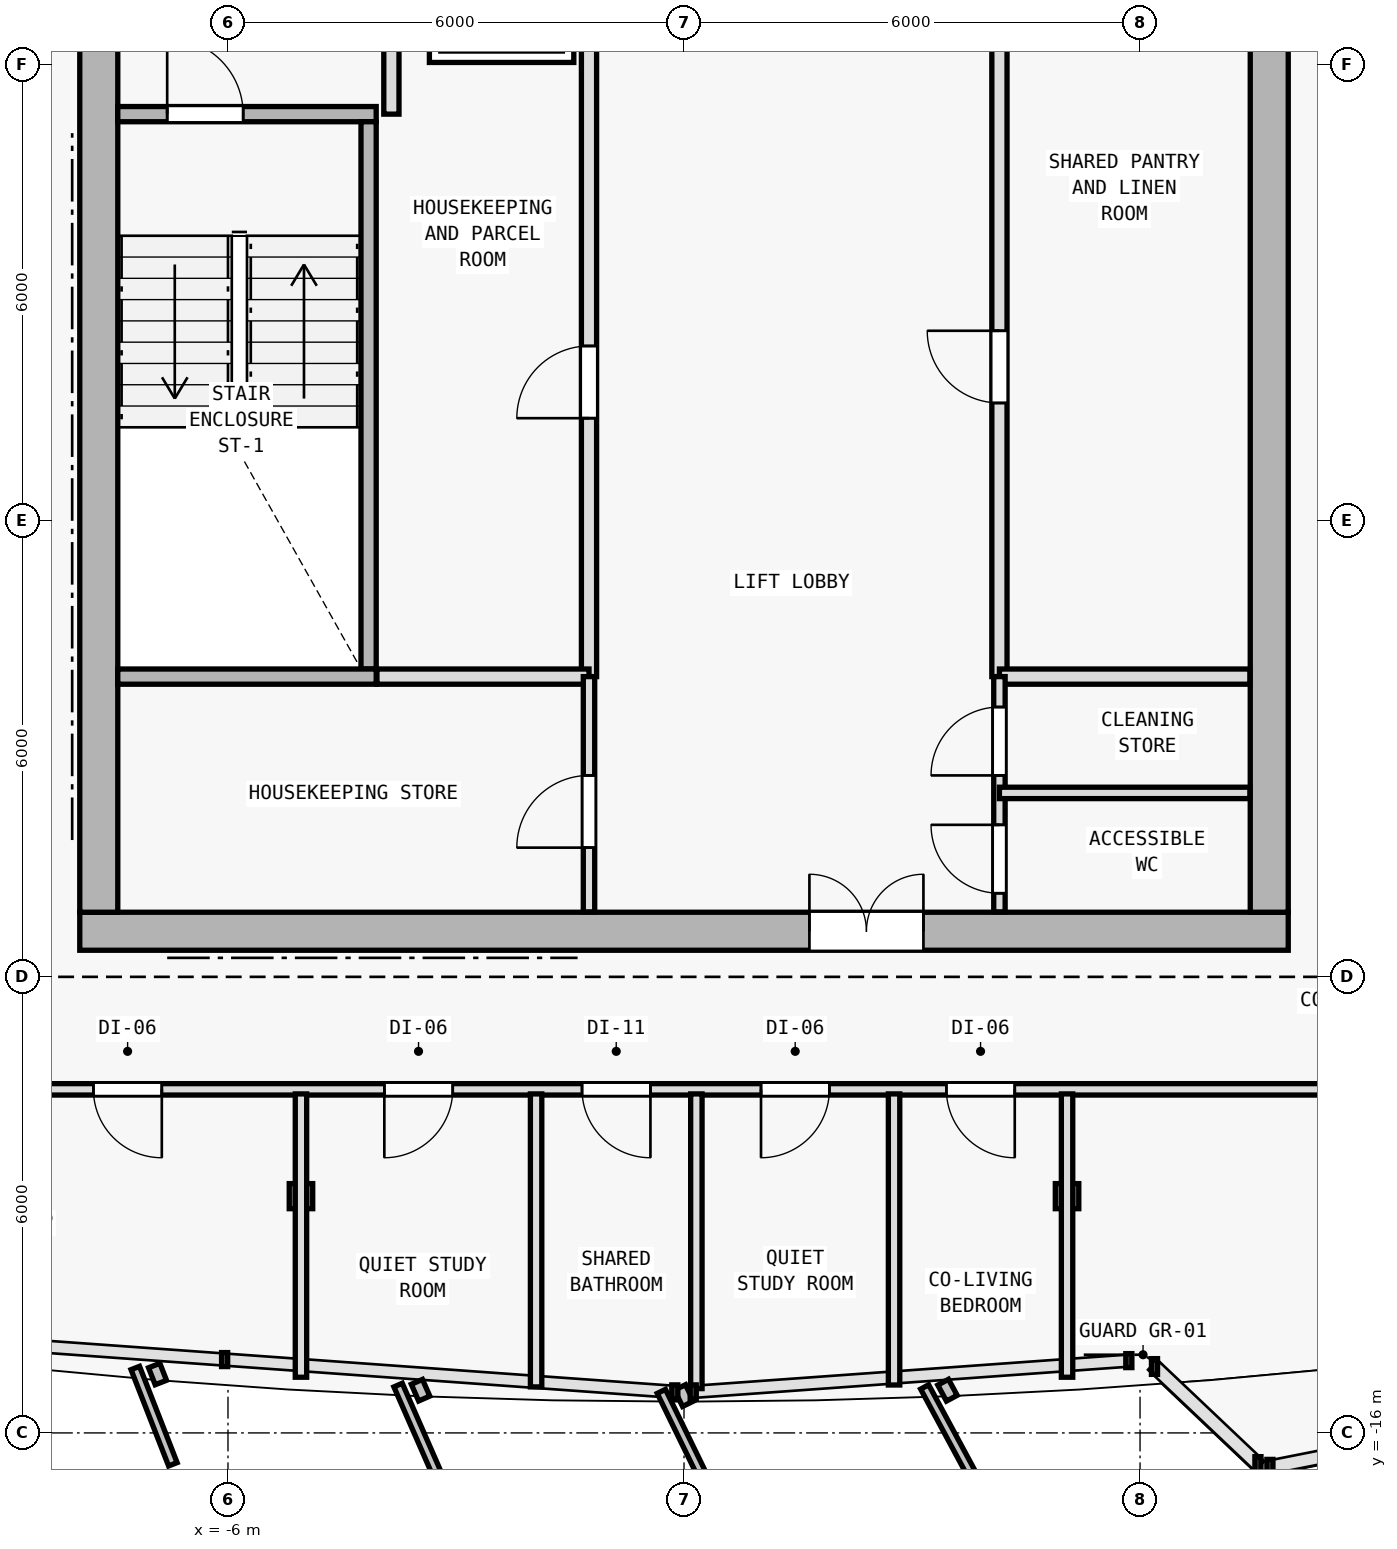
"""IFC4 building model, lengths in metres.
Left out: names, types, materials, properties, quantities, classifications, styles, units other than length and angle.
Written with IfcOpenShell. Run it as: python <this file> out.ifc"""

import sys

from ifc_helpers import new_model, si_unit, direction, frame, frame_2d, origin, origin_2d, place, context, subcontext, project, spatial, rectangle, i_section, extrude, element, fill, save


model = new_model("IFC4")
c1 = context("Model", 3, precision=1e-05, world=origin(), true_north=direction((0.0, 1.0)))
c2 = subcontext(c1, "Body", "Model", "MODEL_VIEW")
j1 = project(units=[si_unit("LENGTHUNIT", "METRE"), si_unit("PLANEANGLEUNIT", "RADIAN")], contexts=[c1])
p1 = place(None, origin())
s1 = spatial("IfcSite", under=j1, at=p1, CompositionType="ELEMENT")
p2 = place(p1, origin())
s2 = spatial("IfcBuilding", under=s1, at=p2, CompositionType="ELEMENT")
p3 = place(p2, frame((0.0, 0.0, 294.0)))
s3 = spatial("IfcBuildingStorey", under=s2, at=p3, CompositionType="ELEMENT", Elevation=294.0)
for number, where, z_axis, x_axis in (
    (1, (-7.7, -9.4, 0.0), (0.0, 0.0, 1.0), (1.0, 0.0, 0.0)),
    (2, (7.7, -9.4, 0.0), (0.0, 0.0, 1.0), (1.0, 0.0, 0.0)),
    (3, (0.0, -9.4, 0.0), (0.0, 0.0, 1.0), (1.0, 0.0, 0.0)),
    (4, (7.7, 0.4, 0.0), (0.0, 0.0, 1.0), (1.0, 0.0, 0.0)),
    (5, (-7.7, 2.0, 0.0), (0.0, 0.0, 1.0), (1.0, 0.0, 0.0)),
):
    element("IfcColumn", number, at=place(p3, frame(where, z_axis=z_axis, x_axis=x_axis)), inside=s3, PredefinedType="COLUMN", context=c2, shape_type="SweptSolid", body=[
        extrude(i_section(OverallWidth=0.374, OverallDepth=0.372, WebThickness=0.012, FlangeThickness=0.02, FilletRadius=0.015, at=origin_2d()), origin(), (0.0, 0.0, 1.0), 3.6),
    ])
for number, where, z_axis, x_axis in (
    (6, (-5.04, -12.885, 0.006), (0.0, 0.0, 1.0), (1.0, 0.0, 0.0)),
    (7, (5.04, -12.885, 0.006), (0.0, 0.0, 1.0), (1.0, 0.0, 0.0)),
):
    element("IfcColumn", number, at=place(p3, frame(where, z_axis=z_axis, x_axis=x_axis)), inside=s3, PredefinedType="COLUMN", context=c2, shape_type="SweptSolid", body=[
        extrude(i_section(OverallWidth=0.309, OverallDepth=0.33, WebThickness=0.011, FlangeThickness=0.019, FilletRadius=0.027, at=origin_2d()), origin(), (0.0, 0.0, 1.0), 3.594),
    ])
p4 = place(p3, frame((-7.95, -9.4, 0.0), z_axis=(0.0, 0.0, 1.0), x_axis=(1.0, 0.0, 0.0)))
e8 = element("IfcWall", 8, at=p4, inside=s3, PredefinedType="SHEAR", context=c2, shape_type="SweptSolid", body=[
    extrude(rectangle(XDim=15.9, YDim=0.5, at=frame_2d((7.95, 0.0))), origin(), (0.0, 0.0, 1.0), 3.34),
])
p5 = place(p4, frame((9.6, 0.0, 0.0)))
e9 = element("IfcOpeningElement", 9, at=p5, cuts=e8, PredefinedType="OPENING", context=c2, shape_type="SweptSolid", body=[
    extrude(rectangle(XDim=1.5, YDim=2.2, at=frame_2d((0.75, 1.1))), frame((0.0, 0.26, 0.0), z_axis=(0.0, -1.0, 0.0), x_axis=(1.0, 0.0, 0.0)), (0.0, 0.0, 1.0), 0.52),
])
p6 = place(p3, frame((-7.7, -9.15, 0.0), z_axis=(0.0, 0.0, 1.0), x_axis=(0.0, 1.0, 0.0)))
e10 = element("IfcWall", 10, at=p6, inside=s3, PredefinedType="SHEAR", context=c2, shape_type="SweptSolid", body=[
    extrude(rectangle(XDim=19.1, YDim=0.5, at=frame_2d((9.55, 0.0))), origin(), (0.0, 0.0, 1.0), 3.34),
])
p7 = place(p6, frame((12.7, 0.0, 0.0)))
e11 = element("IfcOpeningElement", 11, at=p7, cuts=e10, PredefinedType="OPENING", context=c2, shape_type="SweptSolid", body=[
    extrude(rectangle(XDim=1.1, YDim=2.15, at=frame_2d((0.55, 1.075))), frame((0.0, 0.26, 0.0), z_axis=(0.0, -1.0, 0.0), x_axis=(1.0, 0.0, 0.0)), (0.0, 0.0, 1.0), 0.52),
])
p8 = place(p3, frame((7.7, 9.95, 0.0), z_axis=(0.0, 0.0, 1.0), x_axis=(0.0, -1.0, 0.0)))
e12 = element("IfcWall", 12, at=p8, inside=s3, PredefinedType="SHEAR", context=c2, shape_type="SweptSolid", body=[
    extrude(rectangle(XDim=19.1, YDim=0.5, at=frame_2d((9.55, 0.0))), origin(), (0.0, 0.0, 1.0), 3.34),
])
p9 = place(p3, frame((-7.45, 1.35, 0.0), z_axis=(0.0, 0.0, 1.0), x_axis=(1.0, 0.0, 0.0)))
e13 = element("IfcWall", 13, at=p9, inside=s3, PredefinedType="SOLIDWALL", context=c2, shape_type="SweptSolid", body=[
    extrude(rectangle(XDim=3.4, YDim=0.2, at=frame_2d((1.7, 0.0))), origin(), (0.0, 0.0, 1.0), 3.34),
])
p10 = place(p9, frame((0.65, 0.0, 0.0)))
e14 = element("IfcOpeningElement", 14, at=p10, cuts=e13, PredefinedType="OPENING", context=c2, shape_type="SweptSolid", body=[
    extrude(rectangle(XDim=1.0, YDim=2.15, at=frame_2d((0.5, 1.075))), frame((0.0, 0.11, 0.0), z_axis=(0.0, -1.0, 0.0), x_axis=(1.0, 0.0, 0.0)), (0.0, 0.0, 1.0), 0.22),
])
p11 = place(p3, frame((-4.15, -5.95, 0.0), z_axis=(0.0, 0.0, 1.0), x_axis=(0.0, 1.0, 0.0)))
e15 = element("IfcWall", 15, at=p11, inside=s3, PredefinedType="SOLIDWALL", context=c2, shape_type="SweptSolid", body=[
    extrude(rectangle(XDim=7.2, YDim=0.2, at=frame_2d((3.6, 0.0))), origin(), (0.0, 0.0, 1.0), 3.34),
])
p12 = place(p3, frame((-3.85, 1.35, 0.0), z_axis=(0.0, 0.0, 1.0), x_axis=(0.0, 1.0, 0.0)))
e16 = element("IfcWall", 16, at=p12, inside=s3, PredefinedType="SOLIDWALL", context=c2, shape_type="SweptSolid", body=[
    extrude(rectangle(XDim=8.595, YDim=0.2, at=frame_2d((4.297, 0.0))), origin(), (0.0, 0.0, 1.0), 3.34),
])
p13 = place(p12, frame((1.5, 0.0, 0.0)))
e17 = element("IfcOpeningElement", 17, at=p13, cuts=e16, PredefinedType="OPENING", context=c2, shape_type="SweptSolid", body=[
    extrude(rectangle(XDim=1.0, YDim=2.15, at=frame_2d((0.5, 1.075))), frame((0.0, 0.11, 0.0), z_axis=(0.0, -1.0, 0.0), x_axis=(1.0, 0.0, 0.0)), (0.0, 0.0, 1.0), 0.22),
])
p14 = place(p12, frame((3.18, 0.0, 0.0)))
e18 = element("IfcOpeningElement", 18, at=p14, cuts=e16, PredefinedType="OPENING", context=c2, shape_type="SweptSolid", body=[
    extrude(rectangle(XDim=1.0, YDim=2.15, at=frame_2d((0.5, 1.075))), frame((0.0, 0.11, 0.0), z_axis=(0.0, -1.0, 0.0), x_axis=(1.0, 0.0, 0.0)), (0.0, 0.0, 1.0), 0.22),
])
p15 = place(p3, frame((4.15, -6.05, 0.0), z_axis=(0.0, 0.0, 1.0), x_axis=(0.0, 1.0, 0.0)))
e19 = element("IfcWall", 19, at=p15, inside=s3, PredefinedType="SOLIDWALL", context=c2, shape_type="SweptSolid", body=[
    extrude(rectangle(XDim=8.7, YDim=0.2, at=frame_2d((4.35, 0.0))), origin(), (0.0, 0.0, 1.0), 3.34),
])
p16 = place(p15, frame((3.6, 0.0, 0.0)))
e20 = element("IfcOpeningElement", 20, at=p16, cuts=e19, PredefinedType="OPENING", context=c2, shape_type="SweptSolid", body=[
    extrude(rectangle(XDim=0.95, YDim=2.1, at=frame_2d((0.475, 1.05))), frame((0.0, 0.11, 0.0), z_axis=(0.0, -1.0, 0.0), x_axis=(1.0, 0.0, 0.0)), (0.0, 0.0, 1.0), 0.22),
])
p17 = place(p3, frame((-1.25, -6.05, 0.0), z_axis=(0.0, 0.0, 1.0), x_axis=(0.0, 1.0, 0.0)))
e21 = element("IfcWall", 21, at=p17, inside=s3, PredefinedType="SOLIDWALL", context=c2, shape_type="SweptSolid", body=[
    extrude(rectangle(XDim=8.7, YDim=0.2, at=frame_2d((4.35, 0.0))), origin(), (0.0, 0.0, 1.0), 3.34),
])
p18 = place(p17, frame((3.4, 0.0, 0.0)))
e22 = element("IfcOpeningElement", 22, at=p18, cuts=e21, PredefinedType="OPENING", context=c2, shape_type="SweptSolid", body=[
    extrude(rectangle(XDim=0.95, YDim=2.1, at=frame_2d((0.475, 1.05))), frame((0.0, 0.11, 0.0), z_axis=(0.0, -1.0, 0.0), x_axis=(1.0, 0.0, 0.0)), (0.0, 0.0, 1.0), 0.22),
])
p19 = place(p3, frame((-7.45, -6.05, 0.0), z_axis=(0.0, 0.0, 1.0), x_axis=(1.0, 0.0, 0.0)))
e23 = element("IfcWall", 23, at=p19, inside=s3, PredefinedType="SOLIDWALL", context=c2, shape_type="SweptSolid", body=[
    extrude(rectangle(XDim=3.4, YDim=0.2, at=frame_2d((1.7, 0.0))), origin(), (0.0, 0.0, 1.0), 3.34),
])
p20 = place(p3, frame((-4.04, -6.05, 0.0), z_axis=(0.0, 0.0, 1.0), x_axis=(1.0, 0.0, 0.0)))
e24 = element("IfcWall", 24, at=p20, inside=s3, PredefinedType="SOLIDWALL", context=c2, shape_type="SweptSolid", body=[
    extrude(rectangle(XDim=2.79, YDim=0.2, at=frame_2d((1.395, 0.0))), origin(), (0.0, 0.0, 1.0), 3.34),
])
p21 = place(p3, frame((4.15, -6.05, 0.0), z_axis=(0.0, 0.0, 1.0), x_axis=(1.0, 0.0, 0.0)))
e25 = element("IfcWall", 25, at=p21, inside=s3, PredefinedType="SOLIDWALL", context=c2, shape_type="SweptSolid", body=[
    extrude(rectangle(XDim=3.295, YDim=0.2, at=frame_2d((1.647, 0.0))), origin(), (0.0, 0.0, 1.0), 3.34),
])
p22 = place(p3, frame((-1.25, -9.145, 0.0), z_axis=(0.0, 0.0, 1.0), x_axis=(0.0, 1.0, 0.0)))
e26 = element("IfcWall", 26, at=p22, inside=s3, PredefinedType="PARTITIONING", context=c2, shape_type="SweptSolid", body=[
    extrude(rectangle(XDim=3.095, YDim=0.15, at=frame_2d((1.547, 0.0))), origin(), (0.0, 0.0, 1.0), 3.34),
])
p23 = place(p22, frame((0.845, 0.0, 0.0)))
e27 = element("IfcOpeningElement", 27, at=p23, cuts=e26, PredefinedType="OPENING", context=c2, shape_type="SweptSolid", body=[
    extrude(rectangle(XDim=0.95, YDim=2.1, at=frame_2d((0.475, 1.05))), frame((0.0, 0.085, 0.0), z_axis=(0.0, -1.0, 0.0), x_axis=(1.0, 0.0, 0.0)), (0.0, 0.0, 1.0), 0.17),
])
p24 = place(p3, frame((4.15, -9.145, 0.0), z_axis=(0.0, 0.0, 1.0), x_axis=(0.0, 1.0, 0.0)))
e28 = element("IfcWall", 28, at=p24, inside=s3, PredefinedType="PARTITIONING", context=c2, shape_type="SweptSolid", body=[
    extrude(rectangle(XDim=3.095, YDim=0.15, at=frame_2d((1.547, 0.0))), origin(), (0.0, 0.0, 1.0), 3.34),
])
p25 = place(p24, frame((0.245, 0.0, 0.0)))
e29 = element("IfcOpeningElement", 29, at=p25, cuts=e28, PredefinedType="OPENING", context=c2, shape_type="SweptSolid", body=[
    extrude(rectangle(XDim=0.9, YDim=2.1, at=frame_2d((0.45, 1.05))), frame((0.0, 0.085, 0.0), z_axis=(0.0, -1.0, 0.0), x_axis=(1.0, 0.0, 0.0)), (0.0, 0.0, 1.0), 0.17),
])
p26 = place(p24, frame((1.795, 0.0, 0.0)))
e30 = element("IfcOpeningElement", 30, at=p26, cuts=e28, PredefinedType="OPENING", context=c2, shape_type="SweptSolid", body=[
    extrude(rectangle(XDim=0.9, YDim=2.1, at=frame_2d((0.45, 1.05))), frame((0.0, 0.085, 0.0), z_axis=(0.0, -1.0, 0.0), x_axis=(1.0, 0.0, 0.0)), (0.0, 0.0, 1.0), 0.17),
])
p27 = place(p3, frame((4.15, -7.58, 0.0), z_axis=(0.0, 0.0, 1.0), x_axis=(1.0, 0.0, 0.0)))
e31 = element("IfcWall", 31, at=p27, inside=s3, PredefinedType="PARTITIONING", context=c2, shape_type="SweptSolid", body=[
    extrude(rectangle(XDim=3.295, YDim=0.15, at=frame_2d((1.647, 0.0))), origin(), (0.0, 0.0, 1.0), 3.34),
])
p28 = place(p3, frame((9.78, -11.48, 0.0), z_axis=(0.0, 0.0, 1.0), x_axis=(-1.0, 0.0, 0.0)))
e32 = element("IfcWall", 32, at=p28, inside=s3, PredefinedType="PARTITIONING", context=c2, shape_type="SweptSolid", body=[
    extrude(rectangle(XDim=19.56, YDim=0.15, at=frame_2d((9.78, 0.0))), origin(), (0.0, 0.0, 1.0), 2.715),
])
p29 = place(p28, frame((16.651, 0.0, 0.0)))
e33 = element("IfcOpeningElement", 33, at=p29, cuts=e32, PredefinedType="OPENING", context=c2, shape_type="SweptSolid", body=[
    extrude(rectangle(XDim=0.9, YDim=2.1, at=frame_2d((0.45, 1.05))), frame((0.0, 0.085, 0.0), z_axis=(0.0, -1.0, 0.0), x_axis=(1.0, 0.0, 0.0)), (0.0, 0.0, 1.0), 0.17),
])
p30 = place(p28, frame((12.823, 0.0, 0.0)))
e34 = element("IfcOpeningElement", 34, at=p30, cuts=e32, PredefinedType="OPENING", context=c2, shape_type="SweptSolid", body=[
    extrude(rectangle(XDim=0.9, YDim=2.1, at=frame_2d((0.45, 1.05))), frame((0.0, 0.085, 0.0), z_axis=(0.0, -1.0, 0.0), x_axis=(1.0, 0.0, 0.0)), (0.0, 0.0, 1.0), 0.17),
])
p31 = place(p28, frame((10.222, 0.0, 0.0)))
e35 = element("IfcOpeningElement", 35, at=p31, cuts=e32, PredefinedType="OPENING", context=c2, shape_type="SweptSolid", body=[
    extrude(rectangle(XDim=0.9, YDim=2.1, at=frame_2d((0.45, 1.05))), frame((0.0, 0.085, 0.0), z_axis=(0.0, -1.0, 0.0), x_axis=(1.0, 0.0, 0.0)), (0.0, 0.0, 1.0), 0.17),
])
p32 = place(p28, frame((7.867, 0.0, 0.0)))
e36 = element("IfcOpeningElement", 36, at=p32, cuts=e32, PredefinedType="OPENING", context=c2, shape_type="SweptSolid", body=[
    extrude(rectangle(XDim=0.9, YDim=2.1, at=frame_2d((0.45, 1.05))), frame((0.0, 0.085, 0.0), z_axis=(0.0, -1.0, 0.0), x_axis=(1.0, 0.0, 0.0)), (0.0, 0.0, 1.0), 0.17),
])
p33 = place(p28, frame((5.428, 0.0, 0.0)))
e37 = element("IfcOpeningElement", 37, at=p33, cuts=e32, PredefinedType="OPENING", context=c2, shape_type="SweptSolid", body=[
    extrude(rectangle(XDim=0.9, YDim=2.1, at=frame_2d((0.45, 1.05))), frame((0.0, 0.085, 0.0), z_axis=(0.0, -1.0, 0.0), x_axis=(1.0, 0.0, 0.0)), (0.0, 0.0, 1.0), 0.17),
])
p34 = place(p3, frame((-5.04, -11.54, 0.0), z_axis=(0.0, 0.0, 1.0), x_axis=(0.0, -1.0, 0.0)))
e38 = element("IfcWall", 38, at=p34, inside=s3, PredefinedType="PARTITIONING", context=c2, shape_type="SweptSolid", body=[
    extrude(rectangle(XDim=3.727, YDim=0.15, at=frame_2d((1.864, 0.0))), origin(), (0.0, 0.0, 1.0), 3.005),
])
p35 = place(p3, frame((5.04, -11.54, 0.0), z_axis=(0.0, 0.0, 1.0), x_axis=(0.0, -1.0, 0.0)))
e39 = element("IfcWall", 39, at=p35, inside=s3, PredefinedType="PARTITIONING", context=c2, shape_type="SweptSolid", body=[
    extrude(rectangle(XDim=3.727, YDim=0.15, at=frame_2d((1.864, 0.0))), origin(), (0.0, 0.0, 1.0), 2.765),
])
p36 = place(p3, frame((0.163, -11.54, 0.0), z_axis=(0.0, 0.0, 1.0), x_axis=(0.0, -1.0, 0.0)))
e40 = element("IfcWall", 40, at=p36, inside=s3, PredefinedType="PARTITIONING", context=c2, shape_type="SweptSolid", body=[
    extrude(rectangle(XDim=3.877, YDim=0.15, at=frame_2d((1.938, 0.0))), origin(), (0.0, 0.0, 1.0), 3.005),
])
p37 = place(p3, frame((-1.946, -11.54, 0.0), z_axis=(0.0, 0.0, 1.0), x_axis=(0.0, -1.0, 0.0)))
e41 = element("IfcWall", 41, at=p37, inside=s3, PredefinedType="PARTITIONING", context=c2, shape_type="SweptSolid", body=[
    extrude(rectangle(XDim=3.855, YDim=0.15, at=frame_2d((1.927, 0.0))), origin(), (0.0, 0.0, 1.0), 3.005),
])
p38 = place(p3, frame((2.764, -11.54, 0.0), z_axis=(0.0, 0.0, 1.0), x_axis=(0.0, -1.0, 0.0)))
e42 = element("IfcWall", 42, at=p38, inside=s3, PredefinedType="PARTITIONING", context=c2, shape_type="SweptSolid", body=[
    extrude(rectangle(XDim=3.83, YDim=0.15, at=frame_2d((1.915, 0.0))), origin(), (0.0, 0.0, 1.0), 3.005),
])
p39 = place(p5, origin())
e43 = element("IfcDoor", 43, at=p39, inside=s3, OperationType="DOUBLE_DOOR_SINGLE_SWING", PredefinedType="DOOR", context=c2, shape_type="SweptSolid", body=[
    extrude(rectangle(XDim=1.5, YDim=2.2, at=frame_2d((0.75, 1.1))), frame((0.0, 0.025, 0.0), z_axis=(0.0, -1.0, 0.0), x_axis=(1.0, 0.0, 0.0)), (0.0, 0.0, 1.0), 0.05),
])
fill(e9, e43)
p40 = place(p10, origin())
e44 = element("IfcDoor", 44, at=p40, inside=s3, OperationType="SINGLE_SWING_LEFT", PredefinedType="DOOR", context=c2, shape_type="SweptSolid", body=[
    extrude(rectangle(XDim=1.0, YDim=2.15, at=frame_2d((0.5, 1.075))), frame((0.0, 0.025, 0.0), z_axis=(0.0, -1.0, 0.0), x_axis=(1.0, 0.0, 0.0)), (0.0, 0.0, 1.0), 0.05),
])
fill(e14, e44)
p41 = place(p16, origin())
e45 = element("IfcDoor", 45, at=p41, inside=s3, OperationType="SINGLE_SWING_RIGHT", PredefinedType="DOOR", context=c2, shape_type="SweptSolid", body=[
    extrude(rectangle(XDim=0.95, YDim=2.1, at=frame_2d((0.475, 1.05))), frame((0.0, 0.025, 0.0), z_axis=(0.0, -1.0, 0.0), x_axis=(1.0, 0.0, 0.0)), (0.0, 0.0, 1.0), 0.05),
])
fill(e20, e45)
p42 = place(p18, origin())
e46 = element("IfcDoor", 46, at=p42, inside=s3, OperationType="SINGLE_SWING_LEFT", PredefinedType="DOOR", context=c2, shape_type="SweptSolid", body=[
    extrude(rectangle(XDim=0.95, YDim=2.1, at=frame_2d((0.475, 1.05))), frame((0.0, 0.025, 0.0), z_axis=(0.0, -1.0, 0.0), x_axis=(1.0, 0.0, 0.0)), (0.0, 0.0, 1.0), 0.05),
])
fill(e22, e46)
p43 = place(p23, origin())
e47 = element("IfcDoor", 47, at=p43, inside=s3, OperationType="SINGLE_SWING_LEFT", PredefinedType="DOOR", context=c2, shape_type="SweptSolid", body=[
    extrude(rectangle(XDim=0.95, YDim=2.1, at=frame_2d((0.475, 1.05))), frame((0.0, 0.025, 0.0), z_axis=(0.0, -1.0, 0.0), x_axis=(1.0, 0.0, 0.0)), (0.0, 0.0, 1.0), 0.05),
])
fill(e27, e47)
p44 = place(p25, origin())
e48 = element("IfcDoor", 48, at=p44, inside=s3, OperationType="SINGLE_SWING_RIGHT", PredefinedType="DOOR", context=c2, shape_type="SweptSolid", body=[
    extrude(rectangle(XDim=0.9, YDim=2.1, at=frame_2d((0.45, 1.05))), frame((0.0, 0.025, 0.0), z_axis=(0.0, -1.0, 0.0), x_axis=(1.0, 0.0, 0.0)), (0.0, 0.0, 1.0), 0.05),
])
fill(e29, e48)
p45 = place(p26, origin())
e49 = element("IfcDoor", 49, at=p45, inside=s3, OperationType="SINGLE_SWING_LEFT", PredefinedType="DOOR", context=c2, shape_type="SweptSolid", body=[
    extrude(rectangle(XDim=0.9, YDim=2.1, at=frame_2d((0.45, 1.05))), frame((0.0, 0.025, 0.0), z_axis=(0.0, -1.0, 0.0), x_axis=(1.0, 0.0, 0.0)), (0.0, 0.0, 1.0), 0.05),
])
fill(e30, e49)
p46 = place(p29, origin())
e50 = element("IfcDoor", 50, at=p46, inside=s3, OperationType="SINGLE_SWING_LEFT", PredefinedType="DOOR", context=c2, shape_type="SweptSolid", body=[
    extrude(rectangle(XDim=0.9, YDim=2.1, at=frame_2d((0.45, 1.05))), frame((0.0, 0.025, 0.0), z_axis=(0.0, -1.0, 0.0), x_axis=(1.0, 0.0, 0.0)), (0.0, 0.0, 1.0), 0.05),
])
fill(e33, e50)
p47 = place(p30, origin())
e51 = element("IfcDoor", 51, at=p47, inside=s3, OperationType="SINGLE_SWING_RIGHT", PredefinedType="DOOR", context=c2, shape_type="SweptSolid", body=[
    extrude(rectangle(XDim=0.9, YDim=2.1, at=frame_2d((0.45, 1.05))), frame((0.0, 0.025, 0.0), z_axis=(0.0, -1.0, 0.0), x_axis=(1.0, 0.0, 0.0)), (0.0, 0.0, 1.0), 0.05),
])
fill(e34, e51)
p48 = place(p31, origin())
e52 = element("IfcDoor", 52, at=p48, inside=s3, OperationType="SINGLE_SWING_LEFT", PredefinedType="DOOR", context=c2, shape_type="SweptSolid", body=[
    extrude(rectangle(XDim=0.9, YDim=2.1, at=frame_2d((0.45, 1.05))), frame((0.0, 0.025, 0.0), z_axis=(0.0, -1.0, 0.0), x_axis=(1.0, 0.0, 0.0)), (0.0, 0.0, 1.0), 0.05),
])
fill(e35, e52)
p49 = place(p32, origin())
e53 = element("IfcDoor", 53, at=p49, inside=s3, OperationType="SINGLE_SWING_RIGHT", PredefinedType="DOOR", context=c2, shape_type="SweptSolid", body=[
    extrude(rectangle(XDim=0.9, YDim=2.1, at=frame_2d((0.45, 1.05))), frame((0.0, 0.025, 0.0), z_axis=(0.0, -1.0, 0.0), x_axis=(1.0, 0.0, 0.0)), (0.0, 0.0, 1.0), 0.05),
])
fill(e36, e53)
p50 = place(p33, origin())
e54 = element("IfcDoor", 54, at=p50, inside=s3, OperationType="SINGLE_SWING_LEFT", PredefinedType="DOOR", context=c2, shape_type="SweptSolid", body=[
    extrude(rectangle(XDim=0.9, YDim=2.1, at=frame_2d((0.45, 1.05))), frame((0.0, 0.025, 0.0), z_axis=(0.0, -1.0, 0.0), x_axis=(1.0, 0.0, 0.0)), (0.0, 0.0, 1.0), 0.05),
])
fill(e37, e54)
save(model, sys.argv[1])
